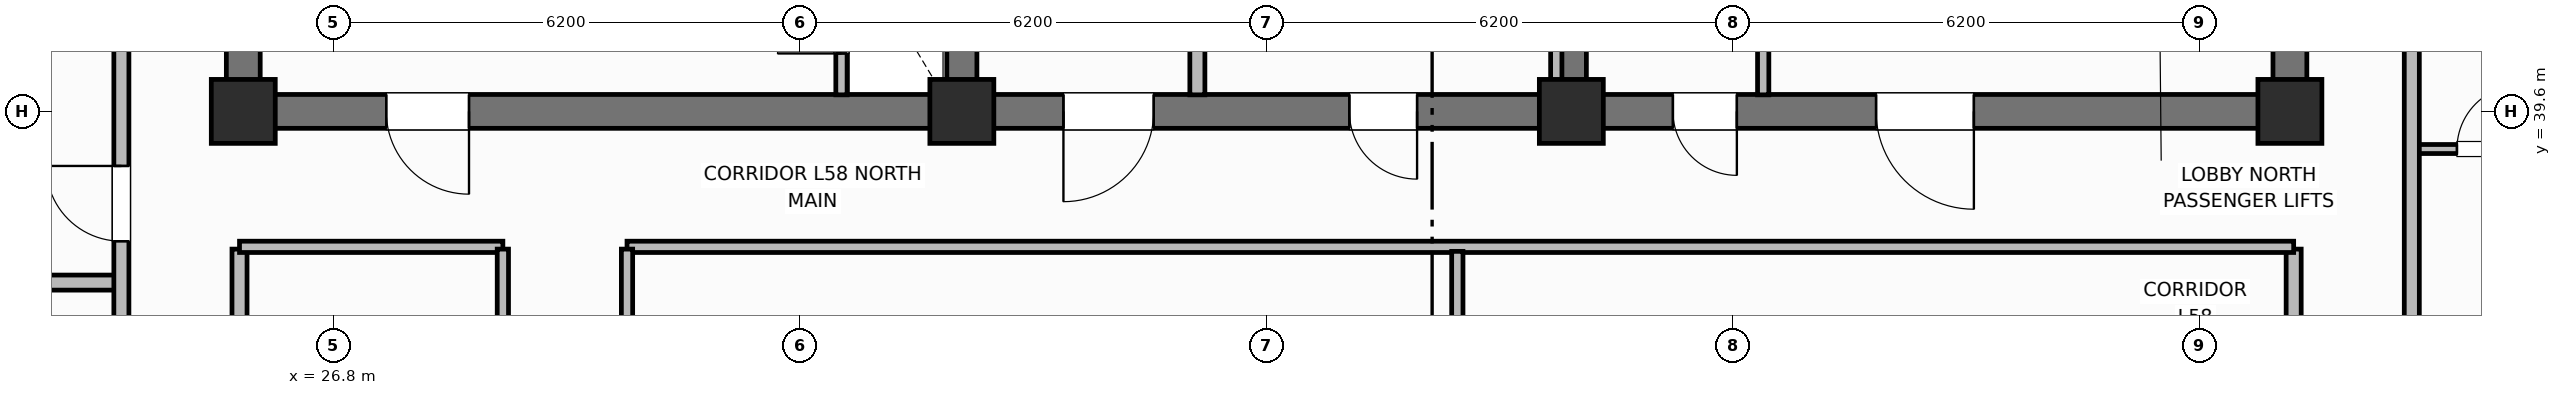
"""IFC4 building model, lengths in metres.
Left out: names, types, materials, properties, quantities, classifications, styles, units other than length and angle.
Written with IfcOpenShell. Run it as: python <this file> out.ifc"""

import sys

from ifc_helpers import new_model, si_unit, direction, frame, frame_2d, origin, origin_2d, place, context, subcontext, project, spatial, rectangle, extrude, element, fill, save


model = new_model("IFC4")
c1 = context("Model", 3, precision=1e-05, world=origin(), true_north=direction((0.0, 1.0)))
c2 = subcontext(c1, "Body", "Model", "MODEL_VIEW")
j1 = project(units=[si_unit("LENGTHUNIT", "METRE"), si_unit("PLANEANGLEUNIT", "RADIAN")], contexts=[c1])
p1 = place(None, origin())
s1 = spatial("IfcSite", under=j1, at=p1, CompositionType="ELEMENT")
p2 = place(p1, origin())
s2 = spatial("IfcBuilding", under=s1, at=p2, CompositionType="ELEMENT")
p3 = place(p2, frame((0.0, 0.0, 233.2)))
s3 = spatial("IfcBuildingStorey", under=s2, at=p3, CompositionType="ELEMENT", Elevation=233.2)
for number, where, z_axis, x_axis in (
    (1, (25.6, 39.825, 0.0), (0.0, 0.0, 1.0), (0.0, 1.0, 0.0)),
    (2, (52.8, 39.825, 0.0), (0.0, 0.0, 1.0), (0.0, 1.0, 0.0)),
):
    element("IfcWall", number, at=place(p3, frame(where, z_axis=z_axis, x_axis=x_axis)), inside=s3, PredefinedType="SHEAR", context=c2, shape_type="SweptSolid", body=[
        extrude(rectangle(XDim=5.75, YDim=0.45, at=frame_2d((2.875, 0.0))), origin(), (0.0, 0.0, 1.0), 3.7),
    ])
p4 = place(p3, frame((52.8, 39.6, 0.0), z_axis=(0.0, 0.0, 1.0), x_axis=(-1.0, 0.0, 0.0)))
e3 = element("IfcWall", 3, at=p4, inside=s3, PredefinedType="SHEAR", context=c2, shape_type="SweptSolid", body=[
    extrude(rectangle(XDim=27.2, YDim=0.45, at=frame_2d((13.6, 0.0))), origin(), (0.0, 0.0, 1.0), 3.7),
])
p5 = place(p4, frame((24.2, 0.0, 0.0)))
e4 = element("IfcOpeningElement", 4, at=p5, cuts=e3, PredefinedType="OPENING", context=c2, shape_type="SweptSolid", body=[
    extrude(rectangle(XDim=1.1, YDim=2.15, at=frame_2d((0.55, 1.075))), frame((0.0, 0.235, 0.0), z_axis=(0.0, -1.0, 0.0), x_axis=(1.0, 0.0, 0.0)), (0.0, 0.0, 1.0), 0.47),
])
p6 = place(p4, frame((15.1, 0.0, 0.0)))
e5 = element("IfcOpeningElement", 5, at=p6, cuts=e3, PredefinedType="OPENING", context=c2, shape_type="SweptSolid", body=[
    extrude(rectangle(XDim=1.2, YDim=2.15, at=frame_2d((0.6, 1.075))), frame((0.0, 0.235, 0.0), z_axis=(0.0, -1.0, 0.0), x_axis=(1.0, 0.0, 0.0)), (0.0, 0.0, 1.0), 0.47),
])
p7 = place(p4, frame((11.6, 0.0, 0.0)))
e6 = element("IfcOpeningElement", 6, at=p7, cuts=e3, PredefinedType="OPENING", context=c2, shape_type="SweptSolid", body=[
    extrude(rectangle(XDim=0.9, YDim=2.1, at=frame_2d((0.45, 1.05))), frame((0.0, 0.235, 0.0), z_axis=(0.0, -1.0, 0.0), x_axis=(1.0, 0.0, 0.0)), (0.0, 0.0, 1.0), 0.47),
])
p8 = place(p4, frame((7.35, 0.0, 0.0)))
e7 = element("IfcOpeningElement", 7, at=p8, cuts=e3, PredefinedType="OPENING", context=c2, shape_type="SweptSolid", body=[
    extrude(rectangle(XDim=0.85, YDim=2.1, at=frame_2d((0.425, 1.05))), frame((0.0, 0.235, 0.0), z_axis=(0.0, -1.0, 0.0), x_axis=(1.0, 0.0, 0.0)), (0.0, 0.0, 1.0), 0.47),
])
p9 = place(p4, frame((4.2, 0.0, 0.0)))
e8 = element("IfcOpeningElement", 8, at=p9, cuts=e3, PredefinedType="OPENING", context=c2, shape_type="SweptSolid", body=[
    extrude(rectangle(XDim=1.3, YDim=2.2, at=frame_2d((0.65, 1.1))), frame((0.0, 0.235, 0.0), z_axis=(0.0, -1.0, 0.0), x_axis=(1.0, 0.0, 0.0)), (0.0, 0.0, 1.0), 0.47),
])
for number, where, z_axis, x_axis in (
    (9, (35.15, 39.825, 0.0), (0.0, 0.0, 1.0), (0.0, 1.0, 0.0)),
    (10, (43.25, 39.825, 0.0), (0.0, 0.0, 1.0), (0.0, 1.0, 0.0)),
):
    element("IfcWall", number, at=place(p3, frame(where, z_axis=z_axis, x_axis=x_axis)), inside=s3, PredefinedType="SHEAR", context=c2, shape_type="SweptSolid", body=[
        extrude(rectangle(XDim=5.75, YDim=0.4, at=frame_2d((2.875, 0.0))), origin(), (0.0, 0.0, 1.0), 3.7),
    ])
for number, where, z_axis, x_axis in (
    (11, (25.6, 39.6, 0.0), (0.0, 0.0, 1.0), (1.0, 0.0, 0.0)),
    (12, (35.15, 39.6, 0.0), (0.0, 0.0, 1.0), (1.0, 0.0, 0.0)),
    (13, (43.25, 39.6, 0.0), (0.0, 0.0, 1.0), (1.0, 0.0, 0.0)),
    (14, (52.8, 39.6, 0.0), (0.0, 0.0, 1.0), (1.0, 0.0, 0.0)),
):
    element("IfcColumn", number, at=place(p3, frame(where, z_axis=z_axis, x_axis=x_axis)), inside=s3, PredefinedType="COLUMN", context=c2, shape_type="SweptSolid", body=[
        extrude(rectangle(XDim=0.85, YDim=0.85, at=origin_2d()), origin(), (0.0, 0.0, 1.0), 3.7),
    ])
p10 = place(p3, frame((33.55, 39.82, 0.0), z_axis=(0.0, 0.0, 1.0), x_axis=(0.0, 1.0, 0.0)))
e15 = element("IfcWall", 15, at=p10, inside=s3, PredefinedType="PARTITIONING", context=c2, shape_type="SweptSolid", body=[
    extrude(rectangle(XDim=2.13, YDim=0.15, at=frame_2d((1.065, 0.0))), origin(), (0.0, 0.0, 1.0), 2.56),
])
p11 = place(p10, frame((0.55, 0.0, 0.0)))
e16 = element("IfcOpeningElement", 16, at=p11, cuts=e15, PredefinedType="OPENING", context=c2, shape_type="SweptSolid", body=[
    extrude(rectangle(XDim=0.85, YDim=2.05, at=frame_2d((0.425, 1.025))), frame((0.0, 0.085, 0.0), z_axis=(0.0, -1.0, 0.0), x_axis=(1.0, 0.0, 0.0)), (0.0, 0.0, 1.0), 0.17),
])
p12 = place(p3, frame((38.28, 39.82, 0.0), z_axis=(0.0, 0.0, 1.0), x_axis=(0.0, 1.0, 0.0)))
e17 = element("IfcWall", 17, at=p12, inside=s3, PredefinedType="PARTITIONING", context=c2, shape_type="SweptSolid", body=[
    extrude(rectangle(XDim=5.63, YDim=0.2, at=frame_2d((2.815, 0.0))), origin(), (0.0, 0.0, 1.0), 2.56),
])
for number, where, z_axis, x_axis in (
    (18, (43.05, 39.82, 0.0), (0.0, 0.0, 1.0), (0.0, 1.0, 0.0)),
    (19, (45.8, 39.82, 0.0), (0.0, 0.0, 1.0), (0.0, 1.0, 0.0)),
):
    element("IfcWall", number, at=place(p3, frame(where, z_axis=z_axis, x_axis=x_axis)), inside=s3, PredefinedType="PARTITIONING", context=c2, shape_type="SweptSolid", body=[
        extrude(rectangle(XDim=5.63, YDim=0.15, at=frame_2d((2.815, 0.0))), origin(), (0.0, 0.0, 1.0), 2.56),
    ])
for number, where, z_axis, x_axis in (
    (20, (25.55, 18.63, 0.0), (0.0, 0.0, 1.0), (0.0, 1.0, 0.0)),
    (21, (52.85, 18.63, 0.0), (0.0, 0.0, 1.0), (0.0, 1.0, 0.0)),
):
    element("IfcWall", number, at=place(p3, frame(where, z_axis=z_axis, x_axis=x_axis)), inside=s3, PredefinedType="PARTITIONING", context=c2, shape_type="SweptSolid", body=[
        extrude(rectangle(XDim=19.14, YDim=0.2, at=frame_2d((9.57, 0.0))), origin(), (0.0, 0.0, 1.0), 2.56),
    ])
p13 = place(p3, frame((25.55, 37.8, 0.0), z_axis=(0.0, 0.0, 1.0), x_axis=(1.0, 0.0, 0.0)))
e22 = element("IfcWall", 22, at=p13, inside=s3, PredefinedType="PARTITIONING", context=c2, shape_type="SweptSolid", body=[
    extrude(rectangle(XDim=3.5, YDim=0.15, at=frame_2d((1.75, 0.0))), origin(), (0.0, 0.0, 1.0), 2.56),
])
p14 = place(p3, frame((30.7, 37.8, 0.0), z_axis=(0.0, 0.0, 1.0), x_axis=(1.0, 0.0, 0.0)))
e23 = element("IfcWall", 23, at=p14, inside=s3, PredefinedType="PARTITIONING", context=c2, shape_type="SweptSolid", body=[
    extrude(rectangle(XDim=22.15, YDim=0.15, at=frame_2d((11.075, 0.0))), origin(), (0.0, 0.0, 1.0), 2.56),
])
p15 = place(p3, frame((41.735, 18.66, 0.0), z_axis=(0.0, 0.0, 1.0), x_axis=(0.0, 1.0, 0.0)))
e24 = element("IfcWall", 24, at=p15, inside=s3, PredefinedType="PARTITIONING", context=c2, shape_type="SweptSolid", body=[
    extrude(rectangle(XDim=19.08, YDim=0.15, at=frame_2d((9.54, 0.0))), origin(), (0.0, 0.0, 1.0), 2.56),
])
p16 = place(p15, frame((6.5, 0.0, 0.0)))
e25 = element("IfcOpeningElement", 25, at=p16, cuts=e24, PredefinedType="OPENING", context=c2, shape_type="SweptSolid", body=[
    extrude(rectangle(XDim=1.0, YDim=2.15, at=frame_2d((0.5, 1.075))), frame((0.0, 0.085, 0.0), z_axis=(0.0, -1.0, 0.0), x_axis=(1.0, 0.0, 0.0)), (0.0, 0.0, 1.0), 0.17),
])
p17 = place(p3, frame((29.05, 18.63, 0.0), z_axis=(0.0, 0.0, 1.0), x_axis=(0.0, 1.0, 0.0)))
e26 = element("IfcWall", 26, at=p17, inside=s3, PredefinedType="PARTITIONING", context=c2, shape_type="SweptSolid", body=[
    extrude(rectangle(XDim=19.14, YDim=0.15, at=frame_2d((9.57, 0.0))), origin(), (0.0, 0.0, 1.0), 2.56),
])
p18 = place(p17, frame((5.5, 0.0, 0.0)))
e27 = element("IfcOpeningElement", 27, at=p18, cuts=e26, PredefinedType="OPENING", context=c2, shape_type="SweptSolid", body=[
    extrude(rectangle(XDim=1.0, YDim=2.15, at=frame_2d((0.5, 1.075))), frame((0.0, 0.085, 0.0), z_axis=(0.0, -1.0, 0.0), x_axis=(1.0, 0.0, 0.0)), (0.0, 0.0, 1.0), 0.17),
])
p19 = place(p3, frame((30.7, 18.63, 0.0), z_axis=(0.0, 0.0, 1.0), x_axis=(0.0, 1.0, 0.0)))
e28 = element("IfcWall", 28, at=p19, inside=s3, PredefinedType="PARTITIONING", context=c2, shape_type="SweptSolid", body=[
    extrude(rectangle(XDim=19.14, YDim=0.15, at=frame_2d((9.57, 0.0))), origin(), (0.0, 0.0, 1.0), 2.56),
])
p20 = place(p19, frame((5.5, 0.0, 0.0)))
e29 = element("IfcOpeningElement", 29, at=p20, cuts=e28, PredefinedType="OPENING", context=c2, shape_type="SweptSolid", body=[
    extrude(rectangle(XDim=1.0, YDim=2.15, at=frame_2d((0.5, 1.075))), frame((0.0, 0.085, 0.0), z_axis=(0.0, -1.0, 0.0), x_axis=(1.0, 0.0, 0.0)), (0.0, 0.0, 1.0), 0.17),
])
p21 = place(p3, frame((19.53, 37.325, 0.0), z_axis=(0.0, 0.0, 1.0), x_axis=(1.0, 0.0, 0.0)))
e30 = element("IfcWall", 30, at=p21, inside=s3, PredefinedType="PARTITIONING", context=c2, shape_type="SweptSolid", body=[
    extrude(rectangle(XDim=4.45, YDim=0.2, at=frame_2d((2.225, 0.0))), origin(), (0.0, 0.0, 1.0), 2.56),
])
p22 = place(p3, frame((23.98, 9.95, 0.0), z_axis=(0.0, 0.0, 1.0), x_axis=(0.0, 1.0, 0.0)))
e31 = element("IfcWall", 31, at=p22, inside=s3, PredefinedType="PARTITIONING", context=c2, shape_type="SweptSolid", body=[
    extrude(rectangle(XDim=36.5, YDim=0.2, at=frame_2d((18.25, 0.0))), origin(), (0.0, 0.0, 1.0), 2.56),
])
p23 = place(p22, frame((2.93, 0.0, 0.0)))
e32 = element("IfcOpeningElement", 32, at=p23, cuts=e31, PredefinedType="OPENING", context=c2, shape_type="SweptSolid", body=[
    extrude(rectangle(XDim=1.0, YDim=2.15, at=frame_2d((0.5, 1.075))), frame((0.0, 0.11, 0.0), z_axis=(0.0, -1.0, 0.0), x_axis=(1.0, 0.0, 0.0)), (0.0, 0.0, 1.0), 0.22),
])
p24 = place(p22, frame((10.525, 0.0, 0.0)))
e33 = element("IfcOpeningElement", 33, at=p24, cuts=e31, PredefinedType="OPENING", context=c2, shape_type="SweptSolid", body=[
    extrude(rectangle(XDim=1.0, YDim=2.15, at=frame_2d((0.5, 1.075))), frame((0.0, 0.11, 0.0), z_axis=(0.0, -1.0, 0.0), x_axis=(1.0, 0.0, 0.0)), (0.0, 0.0, 1.0), 0.22),
])
p25 = place(p22, frame((15.175, 0.0, 0.0)))
e34 = element("IfcOpeningElement", 34, at=p25, cuts=e31, PredefinedType="OPENING", context=c2, shape_type="SweptSolid", body=[
    extrude(rectangle(XDim=1.0, YDim=2.15, at=frame_2d((0.5, 1.075))), frame((0.0, 0.11, 0.0), z_axis=(0.0, -1.0, 0.0), x_axis=(1.0, 0.0, 0.0)), (0.0, 0.0, 1.0), 0.22),
])
p26 = place(p22, frame((27.925, 0.0, 0.0)))
e35 = element("IfcOpeningElement", 35, at=p26, cuts=e31, PredefinedType="OPENING", context=c2, shape_type="SweptSolid", body=[
    extrude(rectangle(XDim=1.0, YDim=2.15, at=frame_2d((0.5, 1.075))), frame((0.0, 0.11, 0.0), z_axis=(0.0, -1.0, 0.0), x_axis=(1.0, 0.0, 0.0)), (0.0, 0.0, 1.0), 0.22),
])
p27 = place(p3, frame((54.42, 39.1, 0.0), z_axis=(0.0, 0.0, 1.0), x_axis=(1.0, 0.0, 0.0)))
e36 = element("IfcWall", 36, at=p27, inside=s3, PredefinedType="PARTITIONING", context=c2, shape_type="SweptSolid", body=[
    extrude(rectangle(XDim=1.95, YDim=0.12, at=frame_2d((0.975, 0.0))), origin(), (0.0, 0.0, 1.0), 2.56),
])
p28 = place(p27, frame((0.6, 0.0, 0.0)))
e37 = element("IfcOpeningElement", 37, at=p28, cuts=e36, PredefinedType="OPENING", context=c2, shape_type="SweptSolid", body=[
    extrude(rectangle(XDim=0.85, YDim=2.1, at=frame_2d((0.425, 1.05))), frame((0.0, 0.07, 0.0), z_axis=(0.0, -1.0, 0.0), x_axis=(1.0, 0.0, 0.0)), (0.0, 0.0, 1.0), 0.14),
])
p29 = place(p3, frame((54.42, 9.95, 0.0), z_axis=(0.0, 0.0, 1.0), x_axis=(0.0, 1.0, 0.0)))
e38 = element("IfcWall", 38, at=p29, inside=s3, PredefinedType="PARTITIONING", context=c2, shape_type="SweptSolid", body=[
    extrude(rectangle(XDim=36.5, YDim=0.2, at=frame_2d((18.25, 0.0))), origin(), (0.0, 0.0, 1.0), 2.56),
])
p30 = place(p29, frame((3.25, 0.0, 0.0)))
e39 = element("IfcOpeningElement", 39, at=p30, cuts=e38, PredefinedType="OPENING", context=c2, shape_type="SweptSolid", body=[
    extrude(rectangle(XDim=1.0, YDim=2.15, at=frame_2d((0.5, 1.075))), frame((0.0, 0.11, 0.0), z_axis=(0.0, -1.0, 0.0), x_axis=(1.0, 0.0, 0.0)), (0.0, 0.0, 1.0), 0.22),
])
p31 = place(p29, frame((12.96, 0.0, 0.0)))
e40 = element("IfcOpeningElement", 40, at=p31, cuts=e38, PredefinedType="OPENING", context=c2, shape_type="SweptSolid", body=[
    extrude(rectangle(XDim=1.0, YDim=2.15, at=frame_2d((0.5, 1.075))), frame((0.0, 0.11, 0.0), z_axis=(0.0, -1.0, 0.0), x_axis=(1.0, 0.0, 0.0)), (0.0, 0.0, 1.0), 0.22),
])
p32 = place(p29, frame((24.3, 0.0, 0.0)))
e41 = element("IfcOpeningElement", 41, at=p32, cuts=e38, PredefinedType="OPENING", context=c2, shape_type="SweptSolid", body=[
    extrude(rectangle(XDim=1.0, YDim=2.15, at=frame_2d((0.5, 1.075))), frame((0.0, 0.11, 0.0), z_axis=(0.0, -1.0, 0.0), x_axis=(1.0, 0.0, 0.0)), (0.0, 0.0, 1.0), 0.22),
])
p33 = place(p11, origin())
e42 = element("IfcDoor", 42, at=p33, inside=s3, OperationType="SINGLE_SWING_LEFT", PredefinedType="TRAPDOOR", context=c2, shape_type="SweptSolid", body=[
    extrude(rectangle(XDim=0.85, YDim=2.05, at=frame_2d((0.425, 1.025))), frame((0.0, 0.025, 0.0), z_axis=(0.0, -1.0, 0.0), x_axis=(1.0, 0.0, 0.0)), (0.0, 0.0, 1.0), 0.05),
])
fill(e16, e42)
p34 = place(p26, origin())
e43 = element("IfcDoor", 43, at=p34, inside=s3, OperationType="SINGLE_SWING_RIGHT", PredefinedType="DOOR", context=c2, shape_type="SweptSolid", body=[
    extrude(rectangle(XDim=1.0, YDim=2.15, at=frame_2d((0.5, 1.075))), frame((0.0, 0.025, 0.0), z_axis=(0.0, -1.0, 0.0), x_axis=(1.0, 0.0, 0.0)), (0.0, 0.0, 1.0), 0.05),
])
fill(e35, e43)
p35 = place(p28, origin())
e44 = element("IfcDoor", 44, at=p35, inside=s3, OperationType="SINGLE_SWING_RIGHT", PredefinedType="DOOR", context=c2, shape_type="SweptSolid", body=[
    extrude(rectangle(XDim=0.85, YDim=2.1, at=frame_2d((0.425, 1.05))), frame((0.0, 0.025, 0.0), z_axis=(0.0, -1.0, 0.0), x_axis=(1.0, 0.0, 0.0)), (0.0, 0.0, 1.0), 0.05),
])
fill(e37, e44)
p36 = place(p5, origin())
e45 = element("IfcDoor", 45, at=p36, inside=s3, OperationType="SINGLE_SWING_LEFT", PredefinedType="DOOR", context=c2, shape_type="SweptSolid", body=[
    extrude(rectangle(XDim=1.1, YDim=2.15, at=frame_2d((0.55, 1.075))), frame((0.0, 0.025, 0.0), z_axis=(0.0, -1.0, 0.0), x_axis=(1.0, 0.0, 0.0)), (0.0, 0.0, 1.0), 0.05),
])
fill(e4, e45)
p37 = place(p6, origin())
e46 = element("IfcDoor", 46, at=p37, inside=s3, OperationType="SINGLE_SWING_RIGHT", PredefinedType="DOOR", context=c2, shape_type="SweptSolid", body=[
    extrude(rectangle(XDim=1.2, YDim=2.15, at=frame_2d((0.6, 1.075))), frame((0.0, 0.025, 0.0), z_axis=(0.0, -1.0, 0.0), x_axis=(1.0, 0.0, 0.0)), (0.0, 0.0, 1.0), 0.05),
])
fill(e5, e46)
p38 = place(p7, origin())
e47 = element("IfcDoor", 47, at=p38, inside=s3, OperationType="SINGLE_SWING_LEFT", PredefinedType="DOOR", context=c2, shape_type="SweptSolid", body=[
    extrude(rectangle(XDim=0.9, YDim=2.1, at=frame_2d((0.45, 1.05))), frame((0.0, 0.025, 0.0), z_axis=(0.0, -1.0, 0.0), x_axis=(1.0, 0.0, 0.0)), (0.0, 0.0, 1.0), 0.05),
])
fill(e6, e47)
p39 = place(p8, origin())
e48 = element("IfcDoor", 48, at=p39, inside=s3, OperationType="SINGLE_SWING_LEFT", PredefinedType="DOOR", context=c2, shape_type="SweptSolid", body=[
    extrude(rectangle(XDim=0.85, YDim=2.1, at=frame_2d((0.425, 1.05))), frame((0.0, 0.025, 0.0), z_axis=(0.0, -1.0, 0.0), x_axis=(1.0, 0.0, 0.0)), (0.0, 0.0, 1.0), 0.05),
])
fill(e7, e48)
p40 = place(p9, origin())
e49 = element("IfcDoor", 49, at=p40, inside=s3, OperationType="SINGLE_SWING_LEFT", PredefinedType="DOOR", context=c2, shape_type="SweptSolid", body=[
    extrude(rectangle(XDim=1.3, YDim=2.2, at=frame_2d((0.65, 1.1))), frame((0.0, 0.025, 0.0), z_axis=(0.0, -1.0, 0.0), x_axis=(1.0, 0.0, 0.0)), (0.0, 0.0, 1.0), 0.05),
])
fill(e8, e49)
save(model, sys.argv[1])
